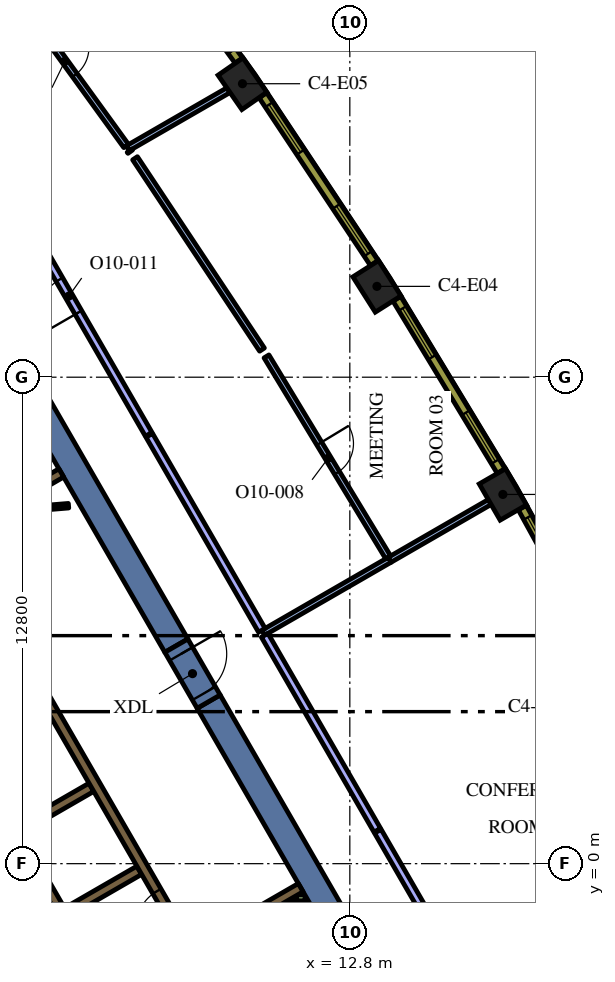
"""IFC4 building model, lengths in metres.
Left out: names, types, materials, properties, quantities, classifications, styles, units other than length and angle.
Written with IfcOpenShell. Run it as: python <this file> out.ifc"""

import sys

from ifc_helpers import new_model, si_unit, direction, frame, frame_2d, origin, origin_2d, place, context, subcontext, project, spatial, rectangle, extrude, element, fill, save


model = new_model("IFC4")
c1 = context("Model", 3, precision=1e-05, world=origin(), true_north=direction((0.0, 1.0)))
c2 = subcontext(c1, "Body", "Model", "MODEL_VIEW")
j1 = project(units=[si_unit("LENGTHUNIT", "METRE"), si_unit("PLANEANGLEUNIT", "RADIAN")], contexts=[c1])
p1 = place(None, origin())
s1 = spatial("IfcSite", under=j1, at=p1, CompositionType="ELEMENT")
p2 = place(p1, origin())
s2 = spatial("IfcBuilding", under=s1, at=p2, CompositionType="ELEMENT")
p3 = place(p2, frame((0.0, 0.0, 252.0)))
s3 = spatial("IfcBuildingStorey", under=s2, at=p3, CompositionType="ELEMENT", Elevation=252.0)
for number, where, z_axis, x_axis in (
    (1, (16.827, 9.715, 0.0), (0.0, 0.0, 1.0), (-0.5, 0.866, 0.0)),
    (2, (13.513, 15.19, 0.0), (0.0, 0.0, 1.0), (-0.536, 0.845, 0.0)),
    (3, (9.975, 20.522, 0.0), (0.0, 0.0, 1.0), (-0.57, 0.822, 0.0)),
):
    element("IfcColumn", number, at=place(p3, frame(where, z_axis=z_axis, x_axis=x_axis)), inside=s3, PredefinedType="COLUMN", context=c2, shape_type="SweptSolid", body=[
        extrude(rectangle(XDim=1.1, YDim=0.8, at=origin_2d()), origin(), (0.0, 0.0, 1.0), 4.2),
    ])
for number, where, z_axis, x_axis in (
    (4, (9.085, 4.264, 0.0), (0.0, 0.0, 1.0), (0.5, -0.866, 0.0)),
    (5, (8.235, 5.736, 0.0), (0.0, 0.0, 1.0), (-0.5, 0.866, 0.0)),
):
    element("IfcWall", number, at=place(p3, frame(where, z_axis=z_axis, x_axis=x_axis)), inside=s3, PredefinedType="SOLIDWALL", context=c2, shape_type="SweptSolid", body=[
        extrude(rectangle(XDim=12.472, YDim=0.7, at=frame_2d((6.236, 0.0))), origin(), (0.0, 0.0, 1.0), 4.2),
    ])
p4 = place(p3, frame((11.507, -0.631, 0.0), z_axis=(0.0, 0.0, 1.0), x_axis=(-0.866025525965, -0.499999788377, 0.0)))
e6 = element("IfcWall", 6, at=p4, inside=s3, PredefinedType="SOLIDWALL", context=c2, shape_type="SweptSolid", body=[
    extrude(rectangle(XDim=1.245, YDim=0.25, at=frame_2d((0.622, 0.0))), origin(), (0.0, 0.0, 1.0), 4.2),
])
p5 = place(p3, frame((6.568, -3.627, 0.0), z_axis=(0.0, 0.0, 1.0), x_axis=(-0.499999455981, 0.866025717874, 0.0)))
e7 = element("IfcWall", 7, at=p5, inside=s3, PredefinedType="SOLIDWALL", context=c2, shape_type="SweptSolid", body=[
    extrude(rectangle(XDim=11.978, YDim=0.25, at=frame_2d((5.989, 0.0))), origin(), (0.0, 0.0, 1.0), 4.2),
])
for number, where, z_axis, x_axis in (
    (8, (4.094, 0.909, 0.0), (0.0, 0.0, 1.0), (0.866, 0.5, 0.0)),
    (9, (5.354, -1.274, 0.0), (0.0, 0.0, 1.0), (0.866, 0.5, 0.0)),
):
    element("IfcWall", number, at=place(p3, frame(where, z_axis=z_axis, x_axis=x_axis)), inside=s3, PredefinedType="SOLIDWALL", context=c2, shape_type="SweptSolid", body=[
        extrude(rectangle(XDim=2.2, YDim=0.25, at=frame_2d((1.1, 0.0))), origin(), (0.0, 0.0, 1.0), 4.2),
    ])
p6 = place(p3, frame((3.83, 9.486, 0.0), z_axis=(0.0, 0.0, 1.0), x_axis=(0.865986202621, 0.500067892261, 0.0)))
e10 = element("IfcWall", 10, at=p6, inside=s3, PredefinedType="SOLIDWALL", context=c2, shape_type="SweptSolid", body=[
    extrude(rectangle(XDim=1.591, YDim=0.25, at=frame_2d((0.795, 0.0))), origin(), (0.0, 0.0, 1.0), 4.2),
])
p7 = place(p3, frame((11.712, -1.05, 0.0), z_axis=(0.0, 0.0, 1.0), x_axis=(-1.0, 0.0, 0.0)))
e11 = element("IfcWall", 11, at=p7, inside=s3, PredefinedType="PARTITIONING", context=c2, shape_type="SweptSolid", body=[
    extrude(rectangle(XDim=0.571, YDim=0.15, at=frame_2d((0.285, 0.0))), origin(), (0.0, 0.0, 1.0), 3.4),
])
p8 = place(p3, frame((11.401, -0.9, 0.0), z_axis=(0.0, 0.0, 1.0), x_axis=(1.0, 0.0, 0.0)))
e12 = element("IfcWall", 12, at=p8, inside=s3, PredefinedType="PARTITIONING", context=c2, shape_type="SweptSolid", body=[
    extrude(rectangle(XDim=0.224, YDim=0.15, at=frame_2d((0.112, 0.0))), origin(), (0.0, 0.0, 1.0), 3.4),
])
p9 = place(p3, frame((8.565, -2.185, 0.0), z_axis=(0.0, 0.0, 1.0), x_axis=(-0.499997954832, 0.866026584559, 0.0)))
e13 = element("IfcWall", 13, at=p9, inside=s3, PredefinedType="SOLIDWALL", context=c2, shape_type="SweptSolid", body=[
    extrude(rectangle(XDim=12.35, YDim=0.25, at=frame_2d((6.175, 0.0))), origin(), (0.0, 0.0, 1.0), 4.2),
])
p10 = place(p9, frame((0.585, 0.0, 0.0)))
e14 = element("IfcOpeningElement", 14, at=p10, cuts=e13, PredefinedType="OPENING", context=c2, shape_type="SweptSolid", body=[
    extrude(rectangle(XDim=1.1, YDim=2.1, at=frame_2d((0.55, 1.05))), frame((0.0, 0.135, 0.0), z_axis=(0.0, -1.0, 0.0), x_axis=(1.0, 0.0, 0.0)), (0.0, 0.0, 1.0), 0.27),
])
p11 = place(p3, frame((5.398, 9.419, 0.0), z_axis=(0.0, 0.0, 1.0), x_axis=(-0.996653416376, -0.081743303248, 0.0)))
e15 = element("IfcWall", 15, at=p11, inside=s3, PredefinedType="PARTITIONING", context=c2, shape_type="SweptSolid", body=[
    extrude(rectangle(XDim=2.7, YDim=0.12, at=frame_2d((1.35, 0.0))), origin(), (0.0, 0.0, 1.0), 3.4),
])
p12 = place(p11, frame((1.45, 0.0, 0.0)))
e16 = element("IfcOpeningElement", 16, at=p12, cuts=e15, PredefinedType="OPENING", context=c2, shape_type="SweptSolid", body=[
    extrude(rectangle(XDim=0.9, YDim=2.1, at=frame_2d((0.45, 1.05))), frame((0.0, 0.07, 0.0), z_axis=(0.0, -1.0, 0.0), x_axis=(1.0, 0.0, 0.0)), (0.0, 0.0, 1.0), 0.14),
])
p13 = place(p3, frame((8.235, 5.736, 0.0), z_axis=(0.0, 0.0, 1.0), x_axis=(0.499954529098, -0.86605165483, 0.0)))
e17 = element("IfcWall", 17, at=p13, inside=s3, PredefinedType="SOLIDWALL", context=c2, shape_type="SweptSolid", body=[
    extrude(rectangle(XDim=1.7, YDim=0.7, at=frame_2d((0.85, 0.0))), origin(), (0.0, 0.0, 1.0), 4.2),
])
p14 = place(p13, frame((0.25, 0.0, 0.0)))
e18 = element("IfcOpeningElement", 18, at=p14, cuts=e17, PredefinedType="OPENING", context=c2, shape_type="SweptSolid", body=[
    extrude(rectangle(XDim=1.2, YDim=2.1, at=frame_2d((0.6, 1.05))), frame((0.0, 0.36, 0.0), z_axis=(0.0, -1.0, 0.0), x_axis=(1.0, 0.0, 0.0)), (0.0, 0.0, 1.0), 0.72),
])
p15 = place(p3, frame((13.844, 7.993, 0.0), z_axis=(0.0, 0.0, 1.0), x_axis=(0.866003976688, 0.500037110984, 0.0)))
e19 = element("IfcWall", 19, at=p15, inside=s3, PredefinedType="PARTITIONING", context=c2, shape_type="SweptSolid", body=[
    extrude(rectangle(XDim=3.045, YDim=0.15, at=frame_2d((1.522, 0.0))), origin(), (0.0, 0.0, 1.0), 3.4),
])
p16 = place(p3, frame((10.522, 6.075, 0.0), z_axis=(0.0, 0.0, 1.0), x_axis=(0.866002601515, 0.500039492609, 0.0)))
e20 = element("IfcWall", 20, at=p16, inside=s3, PredefinedType="PARTITIONING", context=c2, shape_type="SweptSolid", body=[
    extrude(rectangle(XDim=3.844, YDim=0.15, at=frame_2d((1.922, 0.0))), origin(), (0.0, 0.0, 1.0), 3.4),
])
p17 = place(p3, frame((13.522, 0.879, 0.0), z_axis=(0.0, 0.0, 1.0), x_axis=(-0.499994727438, 0.866028447878, 0.0)))
e21 = element("IfcWall", 21, at=p17, inside=s3, PredefinedType="PARTITIONING", context=c2, shape_type="SweptSolid", body=[
    extrude(rectangle(XDim=5.925, YDim=0.2, at=frame_2d((2.962, 0.0))), origin(), (0.0, 0.0, 1.0), 3.4),
])
p18 = place(p3, frame((17.696, -6.35, 0.0), z_axis=(0.0, 0.0, 1.0), x_axis=(-0.500009576767, 0.866019874565, 0.0)))
e22 = element("IfcWall", 22, at=p18, inside=s3, PredefinedType="PARTITIONING", context=c2, shape_type="SweptSolid", body=[
    extrude(rectangle(XDim=8.317, YDim=0.2, at=frame_2d((4.159, 0.0))), origin(), (0.0, 0.0, 1.0), 3.4),
])
p19 = place(p18, frame((3.3, 0.0, 0.0)))
e23 = element("IfcOpeningElement", 23, at=p19, cuts=e22, PredefinedType="OPENING", context=c2, shape_type="SweptSolid", body=[
    extrude(rectangle(XDim=1.8, YDim=2.1, at=frame_2d((0.9, 1.05))), frame((0.0, 0.11, 0.0), z_axis=(0.0, -1.0, 0.0), x_axis=(1.0, 0.0, 0.0)), (0.0, 0.0, 1.0), 0.22),
])
p20 = place(p3, frame((6.958, 18.823, 0.0), z_axis=(0.0, 0.0, 1.0), x_axis=(0.866008752819, 0.500028839209, 0.0)))
e24 = element("IfcWall", 24, at=p20, inside=s3, PredefinedType="PARTITIONING", context=c2, shape_type="SweptSolid", body=[
    extrude(rectangle(XDim=3.058, YDim=0.15, at=frame_2d((1.529, 0.0))), origin(), (0.0, 0.0, 1.0), 3.4),
])
p21 = place(p3, frame((10.607, 13.347, 0.0), z_axis=(0.0, 0.0, 1.0), x_axis=(0.517871895574, -0.855458181196, 0.0)))
e25 = element("IfcWall", 25, at=p21, inside=s3, PredefinedType="PARTITIONING", context=c2, shape_type="SweptSolid", body=[
    extrude(rectangle(XDim=6.182, YDim=0.15, at=frame_2d((3.091, 0.0))), origin(), (0.0, 0.0, 1.0), 3.4),
])
p22 = place(p21, frame((2.682, 0.0, 0.0)))
e26 = element("IfcOpeningElement", 26, at=p22, cuts=e25, PredefinedType="OPENING", context=c2, shape_type="SweptSolid", body=[
    extrude(rectangle(XDim=0.9, YDim=2.1, at=frame_2d((0.45, 1.05))), frame((0.0, 0.085, 0.0), z_axis=(0.0, -1.0, 0.0), x_axis=(1.0, 0.0, 0.0)), (0.0, 0.0, 1.0), 0.17),
])
p23 = place(p3, frame((10.489, 13.526, 0.0), z_axis=(0.0, 0.0, 1.0), x_axis=(-0.552890023891, 0.833254235802, 0.0)))
e27 = element("IfcWall", 27, at=p23, inside=s3, PredefinedType="PARTITIONING", context=c2, shape_type="SweptSolid", body=[
    extrude(rectangle(XDim=6.042, YDim=0.15, at=frame_2d((3.021, 0.0))), origin(), (0.0, 0.0, 1.0), 3.4),
])
p24 = place(p3, frame((7.022, 18.734, 0.0), z_axis=(0.0, 0.0, 1.0), x_axis=(-0.585233084123, 0.810865116556, 0.0)))
e28 = element("IfcWall", 28, at=p24, inside=s3, PredefinedType="PARTITIONING", context=c2, shape_type="SweptSolid", body=[
    extrude(rectangle(XDim=0.035, YDim=0.15, at=frame_2d((0.017, 0.0))), origin(), (0.0, 0.0, 1.0), 3.4),
])
p25 = place(p3, frame((3.689, 23.332, 0.0), z_axis=(0.0, 0.0, 1.0), x_axis=(0.587008354495, -0.809580874128, 0.0)))
e29 = element("IfcWall", 29, at=p25, inside=s3, PredefinedType="PARTITIONING", context=c2, shape_type="SweptSolid", body=[
    extrude(rectangle(XDim=5.493, YDim=0.15, at=frame_2d((2.747, 0.0))), origin(), (0.0, 0.0, 1.0), 3.4),
])
p26 = place(p25, frame((2.294, 0.0, 0.0)))
e30 = element("IfcOpeningElement", 30, at=p26, cuts=e29, PredefinedType="OPENING", context=c2, shape_type="SweptSolid", body=[
    extrude(rectangle(XDim=0.9, YDim=2.1, at=frame_2d((0.45, 1.05))), frame((0.0, 0.085, 0.0), z_axis=(0.0, -1.0, 0.0), x_axis=(1.0, 0.0, 0.0)), (0.0, 0.0, 1.0), 0.17),
])
p27 = place(p3, frame((10.485, 6.14, 0.0), z_axis=(0.0, 0.0, 1.0), x_axis=(-0.499976885332, 0.866038748633, 0.0)))
e31 = element("IfcWall", 31, at=p27, inside=s3, PredefinedType="PARTITIONING", context=c2, shape_type="SweptSolid", body=[
    extrude(rectangle(XDim=5.925, YDim=0.2, at=frame_2d((2.962, 0.0))), origin(), (0.0, 0.0, 1.0), 3.4),
])
p28 = place(p3, frame((7.507, 11.297, 0.0), z_axis=(0.0, 0.0, 1.0), x_axis=(-0.499987561347, 0.866032585125, 0.0)))
e32 = element("IfcWall", 32, at=p28, inside=s3, PredefinedType="PARTITIONING", context=c2, shape_type="SweptSolid", body=[
    extrude(rectangle(XDim=8.317, YDim=0.2, at=frame_2d((4.159, 0.0))), origin(), (0.0, 0.0, 1.0), 3.4),
])
p29 = place(p28, frame((3.7, 0.0, 0.0)))
e33 = element("IfcOpeningElement", 33, at=p29, cuts=e32, PredefinedType="OPENING", context=c2, shape_type="SweptSolid", body=[
    extrude(rectangle(XDim=1.0, YDim=2.1, at=frame_2d((0.5, 1.05))), frame((0.0, 0.11, 0.0), z_axis=(0.0, -1.0, 0.0), x_axis=(1.0, 0.0, 0.0)), (0.0, 0.0, 1.0), 0.22),
])
p30 = place(p3, frame((19.892, 4.725, 0.0), z_axis=(0.0, 0.0, 1.0), x_axis=(-0.481925825015, 0.876212017256, 0.0)))
e34 = element("IfcWall", 34, at=p30, inside=s3, PredefinedType="SOLIDWALL", context=c2, shape_type="SweptSolid", body=[
    extrude(rectangle(XDim=5.299, YDim=0.24, at=frame_2d((2.649, 0.0))), origin(), (0.0, 0.0, 1.0), 3.9),
])
p31 = place(p30, frame((0.295, 0.0, 0.9)))
e35 = element("IfcOpeningElement", 35, at=p31, cuts=e34, PredefinedType="OPENING", context=c2, shape_type="SweptSolid", body=[
    extrude(rectangle(XDim=1.5, YDim=2.55, at=frame_2d((0.75, 1.275))), frame((0.0, 0.13, 0.0), z_axis=(0.0, -1.0, 0.0), x_axis=(1.0, 0.0, 0.0)), (0.0, 0.0, 1.0), 0.26),
])
p32 = place(p30, frame((3.504, 0.0, 0.9)))
e36 = element("IfcOpeningElement", 36, at=p32, cuts=e34, PredefinedType="OPENING", context=c2, shape_type="SweptSolid", body=[
    extrude(rectangle(XDim=1.5, YDim=2.55, at=frame_2d((0.75, 1.275))), frame((0.0, 0.13, 0.0), z_axis=(0.0, -1.0, 0.0), x_axis=(1.0, 0.0, 0.0)), (0.0, 0.0, 1.0), 0.26),
])
p33 = place(p3, frame((16.782, 10.331, 0.0), z_axis=(0.0, 0.0, 1.0), x_axis=(-0.517846166225, 0.855473756538, 0.0)))
e37 = element("IfcWall", 37, at=p33, inside=s3, PredefinedType="SOLIDWALL", context=c2, shape_type="SweptSolid", body=[
    extrude(rectangle(XDim=5.298, YDim=0.24, at=frame_2d((2.649, 0.0))), origin(), (0.0, 0.0, 1.0), 3.9),
])
p34 = place(p33, frame((0.294, 0.0, 0.9)))
e38 = element("IfcOpeningElement", 38, at=p34, cuts=e37, PredefinedType="OPENING", context=c2, shape_type="SweptSolid", body=[
    extrude(rectangle(XDim=1.5, YDim=2.55, at=frame_2d((0.75, 1.275))), frame((0.0, 0.13, 0.0), z_axis=(0.0, -1.0, 0.0), x_axis=(1.0, 0.0, 0.0)), (0.0, 0.0, 1.0), 0.26),
])
p35 = place(p33, frame((3.504, 0.0, 0.9)))
e39 = element("IfcOpeningElement", 39, at=p35, cuts=e37, PredefinedType="OPENING", context=c2, shape_type="SweptSolid", body=[
    extrude(rectangle(XDim=1.5, YDim=2.55, at=frame_2d((0.75, 1.275))), frame((0.0, 0.13, 0.0), z_axis=(0.0, -1.0, 0.0), x_axis=(1.0, 0.0, 0.0)), (0.0, 0.0, 1.0), 0.26),
])
p36 = place(p3, frame((13.442, 15.803, 0.0), z_axis=(0.0, 0.0, 1.0), x_axis=(-0.552901821755, 0.833246407433, 0.0)))
e40 = element("IfcWall", 40, at=p36, inside=s3, PredefinedType="SOLIDWALL", context=c2, shape_type="SweptSolid", body=[
    extrude(rectangle(XDim=5.298, YDim=0.24, at=frame_2d((2.649, 0.0))), origin(), (0.0, 0.0, 1.0), 3.9),
])
p37 = place(p36, frame((0.295, 0.0, 0.9)))
e41 = element("IfcOpeningElement", 41, at=p37, cuts=e40, PredefinedType="OPENING", context=c2, shape_type="SweptSolid", body=[
    extrude(rectangle(XDim=1.5, YDim=2.55, at=frame_2d((0.75, 1.275))), frame((0.0, 0.13, 0.0), z_axis=(0.0, -1.0, 0.0), x_axis=(1.0, 0.0, 0.0)), (0.0, 0.0, 1.0), 0.26),
])
p38 = place(p36, frame((3.504, 0.0, 0.9)))
e42 = element("IfcOpeningElement", 42, at=p38, cuts=e40, PredefinedType="OPENING", context=c2, shape_type="SweptSolid", body=[
    extrude(rectangle(XDim=1.5, YDim=2.55, at=frame_2d((0.75, 1.275))), frame((0.0, 0.13, 0.0), z_axis=(0.0, -1.0, 0.0), x_axis=(1.0, 0.0, 0.0)), (0.0, 0.0, 1.0), 0.26),
])
p39 = place(p3, frame((9.878, 21.132, 0.0), z_axis=(0.0, 0.0, 1.0), x_axis=(-0.586998456641, 0.80958805074, 0.0)))
e43 = element("IfcWall", 43, at=p39, inside=s3, PredefinedType="SOLIDWALL", context=c2, shape_type="SweptSolid", body=[
    extrude(rectangle(XDim=5.311, YDim=0.24, at=frame_2d((2.655, 0.0))), origin(), (0.0, 0.0, 1.0), 3.9),
])
p40 = place(p39, frame((0.306, 0.0, 0.9)))
e44 = element("IfcOpeningElement", 44, at=p40, cuts=e43, PredefinedType="OPENING", context=c2, shape_type="SweptSolid", body=[
    extrude(rectangle(XDim=1.5, YDim=2.55, at=frame_2d((0.75, 1.275))), frame((0.0, 0.13, 0.0), z_axis=(0.0, -1.0, 0.0), x_axis=(1.0, 0.0, 0.0)), (0.0, 0.0, 1.0), 0.26),
])
p41 = place(p39, frame((3.539, 0.0, 0.9)))
e45 = element("IfcOpeningElement", 45, at=p41, cuts=e43, PredefinedType="OPENING", context=c2, shape_type="SweptSolid", body=[
    extrude(rectangle(XDim=1.5, YDim=2.55, at=frame_2d((0.75, 1.275))), frame((0.0, 0.13, 0.0), z_axis=(0.0, -1.0, 0.0), x_axis=(1.0, 0.0, 0.0)), (0.0, 0.0, 1.0), 0.26),
])
p42 = place(p10, origin())
e46 = element("IfcDoor", 46, at=p42, inside=s3, OperationType="DOUBLE_DOOR_SLIDING", PredefinedType="DOOR", context=c2, shape_type="SweptSolid", body=[
    extrude(rectangle(XDim=1.1, YDim=2.1, at=frame_2d((0.55, 1.05))), frame((0.0, 0.025, 0.0), z_axis=(0.0, -1.0, 0.0), x_axis=(1.0, 0.0, 0.0)), (0.0, 0.0, 1.0), 0.05),
])
fill(e14, e46)
p43 = place(p14, origin())
e47 = element("IfcDoor", 47, at=p43, inside=s3, OperationType="SINGLE_SWING_LEFT", PredefinedType="DOOR", context=c2, shape_type="SweptSolid", body=[
    extrude(rectangle(XDim=1.2, YDim=2.1, at=frame_2d((0.6, 1.05))), frame((0.0, 0.025, 0.0), z_axis=(0.0, -1.0, 0.0), x_axis=(1.0, 0.0, 0.0)), (0.0, 0.0, 1.0), 0.05),
])
fill(e18, e47)
p44 = place(p22, origin())
e48 = element("IfcDoor", 48, at=p44, inside=s3, OperationType="SINGLE_SWING_RIGHT", PredefinedType="DOOR", context=c2, shape_type="SweptSolid", body=[
    extrude(rectangle(XDim=0.9, YDim=2.1, at=frame_2d((0.45, 1.05))), frame((0.0, 0.025, 0.0), z_axis=(0.0, -1.0, 0.0), x_axis=(1.0, 0.0, 0.0)), (0.0, 0.0, 1.0), 0.05),
])
fill(e26, e48)
p45 = place(p26, origin())
e49 = element("IfcDoor", 49, at=p45, inside=s3, OperationType="SINGLE_SWING_LEFT", PredefinedType="DOOR", context=c2, shape_type="SweptSolid", body=[
    extrude(rectangle(XDim=0.9, YDim=2.1, at=frame_2d((0.45, 1.05))), frame((0.0, 0.025, 0.0), z_axis=(0.0, -1.0, 0.0), x_axis=(1.0, 0.0, 0.0)), (0.0, 0.0, 1.0), 0.05),
])
fill(e30, e49)
p46 = place(p29, origin())
e50 = element("IfcDoor", 50, at=p46, inside=s3, OperationType="SINGLE_SWING_RIGHT", PredefinedType="DOOR", context=c2, shape_type="SweptSolid", body=[
    extrude(rectangle(XDim=1.0, YDim=2.1, at=frame_2d((0.5, 1.05))), frame((0.0, 0.025, 0.0), z_axis=(0.0, -1.0, 0.0), x_axis=(1.0, 0.0, 0.0)), (0.0, 0.0, 1.0), 0.05),
])
fill(e33, e50)
p47 = place(p32, origin())
e51 = element("IfcWindow", 51, at=p47, inside=s3, PartitioningType="SINGLE_PANEL", PredefinedType="WINDOW", context=c2, shape_type="SweptSolid", body=[
    extrude(rectangle(XDim=1.5, YDim=2.55, at=frame_2d((0.75, 1.275))), frame((0.0, 0.04, 0.0), z_axis=(0.0, -1.0, 0.0), x_axis=(1.0, 0.0, 0.0)), (0.0, 0.0, 1.0), 0.06),
])
fill(e36, e51)
p48 = place(p34, origin())
e52 = element("IfcWindow", 52, at=p48, inside=s3, PartitioningType="SINGLE_PANEL", PredefinedType="WINDOW", context=c2, shape_type="SweptSolid", body=[
    extrude(rectangle(XDim=1.5, YDim=2.55, at=frame_2d((0.75, 1.275))), frame((0.0, 0.04, 0.0), z_axis=(0.0, -1.0, 0.0), x_axis=(1.0, 0.0, 0.0)), (0.0, 0.0, 1.0), 0.06),
])
fill(e38, e52)
p49 = place(p35, origin())
e53 = element("IfcWindow", 53, at=p49, inside=s3, PartitioningType="SINGLE_PANEL", PredefinedType="WINDOW", context=c2, shape_type="SweptSolid", body=[
    extrude(rectangle(XDim=1.5, YDim=2.55, at=frame_2d((0.75, 1.275))), frame((0.0, 0.04, 0.0), z_axis=(0.0, -1.0, 0.0), x_axis=(1.0, 0.0, 0.0)), (0.0, 0.0, 1.0), 0.06),
])
fill(e39, e53)
p50 = place(p37, origin())
e54 = element("IfcWindow", 54, at=p50, inside=s3, PartitioningType="SINGLE_PANEL", PredefinedType="WINDOW", context=c2, shape_type="SweptSolid", body=[
    extrude(rectangle(XDim=1.5, YDim=2.55, at=frame_2d((0.75, 1.275))), frame((0.0, 0.04, 0.0), z_axis=(0.0, -1.0, 0.0), x_axis=(1.0, 0.0, 0.0)), (0.0, 0.0, 1.0), 0.06),
])
fill(e41, e54)
p51 = place(p38, origin())
e55 = element("IfcWindow", 55, at=p51, inside=s3, PartitioningType="SINGLE_PANEL", PredefinedType="WINDOW", context=c2, shape_type="SweptSolid", body=[
    extrude(rectangle(XDim=1.5, YDim=2.55, at=frame_2d((0.75, 1.275))), frame((0.0, 0.04, 0.0), z_axis=(0.0, -1.0, 0.0), x_axis=(1.0, 0.0, 0.0)), (0.0, 0.0, 1.0), 0.06),
])
fill(e42, e55)
save(model, sys.argv[1])
